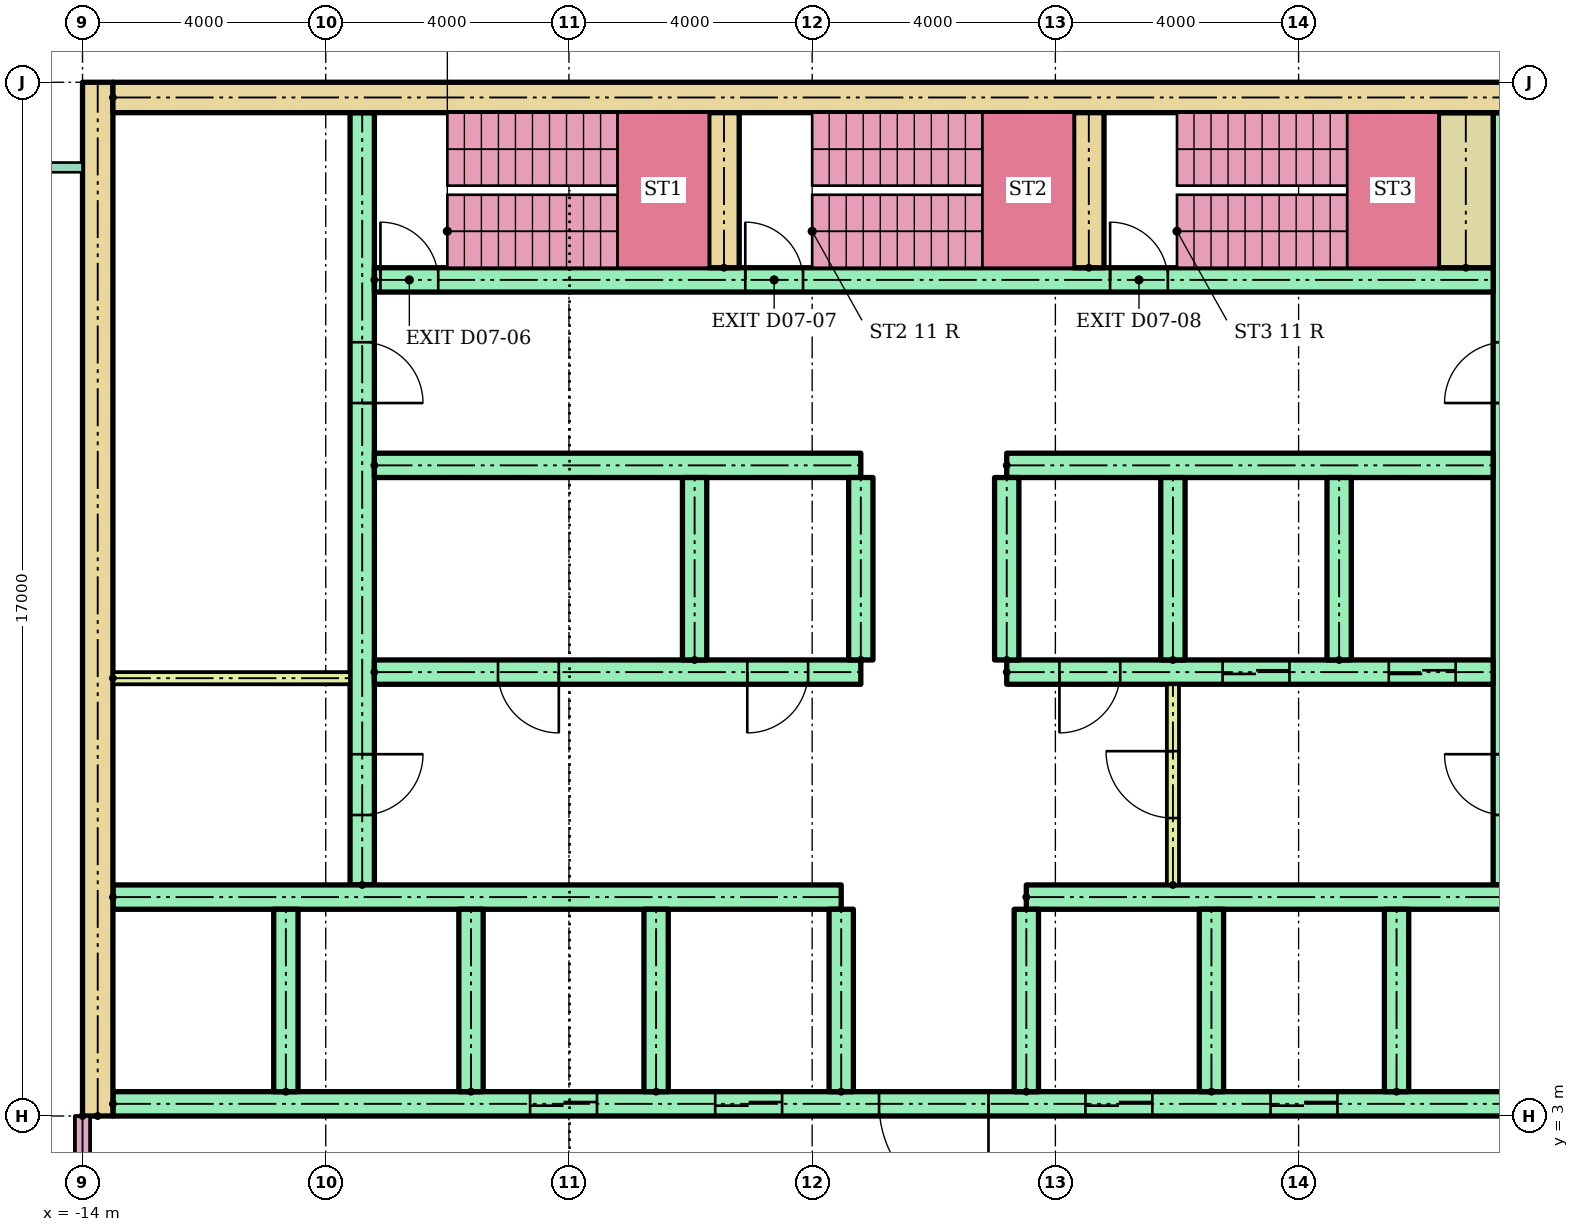
"""IFC4 building model, lengths in metres.
Left out: names, types, materials, properties, quantities, classifications, styles, units other than length and angle.
Written with IfcOpenShell. Run it as: python <this file> out.ifc"""

import sys

from ifc_helpers import new_model, si_unit, direction, frame, frame_2d, origin, place, context, subcontext, project, spatial, rectangle, extrude, element, fill, save


model = new_model("IFC4")
c1 = context("Model", 3, precision=1e-05, world=origin(), true_north=direction((0.0, 1.0)))
c2 = subcontext(c1, "Body", "Model", "MODEL_VIEW")
j1 = project(units=[si_unit("LENGTHUNIT", "METRE"), si_unit("PLANEANGLEUNIT", "RADIAN")], contexts=[c1])
p1 = place(None, origin())
s1 = spatial("IfcSite", under=j1, at=p1, CompositionType="ELEMENT")
p2 = place(p1, origin())
s2 = spatial("IfcBuilding", under=s1, at=p2, CompositionType="ELEMENT")
p3 = place(p2, frame((0.0, 0.0, 29.9)))
s3 = spatial("IfcBuildingStorey", under=s2, at=p3, CompositionType="ELEMENT", Elevation=29.9)
p4 = place(p3, frame((-13.75, 3.0, 0.0), z_axis=(0.0, 0.0, 1.0), x_axis=(0.0, 1.0, 0.0)))
e1 = element("IfcWall", 1, at=p4, inside=s3, PredefinedType="SHEAR", context=c2, shape_type="SweptSolid", body=[
    extrude(rectangle(XDim=17.0, YDim=0.5, at=frame_2d((8.5, 0.0))), origin(), (0.0, 0.0, 1.0), 3.6),
])
p5 = place(p3, frame((-13.5, 19.75, 0.0)))
e2 = element("IfcWall", 2, at=p5, inside=s3, PredefinedType="SHEAR", context=c2, shape_type="SweptSolid", body=[
    extrude(rectangle(XDim=27.0, YDim=0.5, at=frame_2d((13.5, 0.0))), origin(), (0.0, 0.0, 1.0), 3.6),
])
p6 = place(p3, frame((-9.4, 6.8, 0.0), z_axis=(0.0, 0.0, 1.0), x_axis=(0.0, 1.0, 0.0)))
e3 = element("IfcWall", 3, at=p6, inside=s3, PredefinedType="SHEAR", context=c2, shape_type="SweptSolid", body=[
    extrude(rectangle(XDim=12.7, YDim=0.4, at=frame_2d((6.35, 0.0))), origin(), (0.0, 0.0, 1.0), 3.6),
])
p7 = place(p6, frame((1.15, 0.0, 0.0)))
e4 = element("IfcOpeningElement", 4, at=p7, cuts=e3, PredefinedType="OPENING", context=c2, shape_type="SweptSolid", body=[
    extrude(rectangle(XDim=1.0, YDim=2.1, at=frame_2d((0.5, 1.05))), frame((0.0, 0.21, 0.0), z_axis=(0.0, -1.0, 0.0), x_axis=(1.0, 0.0, 0.0)), (0.0, 0.0, 1.0), 0.42),
])
p8 = place(p6, frame((7.925, 0.0, 0.0)))
e5 = element("IfcOpeningElement", 5, at=p8, cuts=e3, PredefinedType="OPENING", context=c2, shape_type="SweptSolid", body=[
    extrude(rectangle(XDim=1.0, YDim=2.1, at=frame_2d((0.5, 1.05))), frame((0.0, 0.21, 0.0), z_axis=(0.0, -1.0, 0.0), x_axis=(1.0, 0.0, 0.0)), (0.0, 0.0, 1.0), 0.42),
])
p9 = place(p3, frame((9.4, 6.8, 0.0), z_axis=(0.0, 0.0, 1.0), x_axis=(0.0, 1.0, 0.0)))
e6 = element("IfcWall", 6, at=p9, inside=s3, PredefinedType="SHEAR", context=c2, shape_type="SweptSolid", body=[
    extrude(rectangle(XDim=12.7, YDim=0.4, at=frame_2d((6.35, 0.0))), origin(), (0.0, 0.0, 1.0), 3.6),
])
p10 = place(p9, frame((1.15, 0.0, 0.0)))
e7 = element("IfcOpeningElement", 7, at=p10, cuts=e6, PredefinedType="OPENING", context=c2, shape_type="SweptSolid", body=[
    extrude(rectangle(XDim=1.0, YDim=2.1, at=frame_2d((0.5, 1.05))), frame((0.0, 0.21, 0.0), z_axis=(0.0, -1.0, 0.0), x_axis=(1.0, 0.0, 0.0)), (0.0, 0.0, 1.0), 0.42),
])
p11 = place(p9, frame((7.925, 0.0, 0.0)))
e8 = element("IfcOpeningElement", 8, at=p11, cuts=e6, PredefinedType="OPENING", context=c2, shape_type="SweptSolid", body=[
    extrude(rectangle(XDim=1.0, YDim=2.1, at=frame_2d((0.5, 1.05))), frame((0.0, 0.21, 0.0), z_axis=(0.0, -1.0, 0.0), x_axis=(1.0, 0.0, 0.0)), (0.0, 0.0, 1.0), 0.42),
])
p12 = place(p3, frame((-13.5, 3.2, 0.0)))
e9 = element("IfcWall", 9, at=p12, inside=s3, PredefinedType="SHEAR", context=c2, shape_type="SweptSolid", body=[
    extrude(rectangle(XDim=27.0, YDim=0.4, at=frame_2d((13.5, 0.0))), origin(), (0.0, 0.0, 1.0), 3.6),
])
p13 = place(p12, frame((6.861, 0.0, 0.0)))
e10 = element("IfcOpeningElement", 10, at=p13, cuts=e9, PredefinedType="OPENING", context=c2, shape_type="SweptSolid", body=[
    extrude(rectangle(XDim=1.1, YDim=2.1, at=frame_2d((0.55, 1.05))), frame((0.0, 0.21, 0.0), z_axis=(0.0, -1.0, 0.0), x_axis=(1.0, 0.0, 0.0)), (0.0, 0.0, 1.0), 0.42),
])
p14 = place(p12, frame((9.906, 0.0, 0.0)))
e11 = element("IfcOpeningElement", 11, at=p14, cuts=e9, PredefinedType="OPENING", context=c2, shape_type="SweptSolid", body=[
    extrude(rectangle(XDim=1.1, YDim=2.1, at=frame_2d((0.55, 1.05))), frame((0.0, 0.21, 0.0), z_axis=(0.0, -1.0, 0.0), x_axis=(1.0, 0.0, 0.0)), (0.0, 0.0, 1.0), 0.42),
])
p15 = place(p12, frame((15.994, 0.0, 0.0)))
e12 = element("IfcOpeningElement", 12, at=p15, cuts=e9, PredefinedType="OPENING", context=c2, shape_type="SweptSolid", body=[
    extrude(rectangle(XDim=1.1, YDim=2.1, at=frame_2d((0.55, 1.05))), frame((0.0, 0.21, 0.0), z_axis=(0.0, -1.0, 0.0), x_axis=(1.0, 0.0, 0.0)), (0.0, 0.0, 1.0), 0.42),
])
p16 = place(p12, frame((19.039, 0.0, 0.0)))
e13 = element("IfcOpeningElement", 13, at=p16, cuts=e9, PredefinedType="OPENING", context=c2, shape_type="SweptSolid", body=[
    extrude(rectangle(XDim=1.1, YDim=2.1, at=frame_2d((0.55, 1.05))), frame((0.0, 0.21, 0.0), z_axis=(0.0, -1.0, 0.0), x_axis=(1.0, 0.0, 0.0)), (0.0, 0.0, 1.0), 0.42),
])
p17 = place(p12, frame((12.6, 0.0, 0.0)))
e14 = element("IfcOpeningElement", 14, at=p17, cuts=e9, PredefinedType="OPENING", context=c2, shape_type="SweptSolid", body=[
    extrude(rectangle(XDim=1.8, YDim=2.1, at=frame_2d((0.9, 1.05))), frame((0.0, 0.21, 0.0), z_axis=(0.0, -1.0, 0.0), x_axis=(1.0, 0.0, 0.0)), (0.0, 0.0, 1.0), 0.42),
])
p18 = place(p3, frame((-13.5, 6.6, 0.0)))
e15 = element("IfcWall", 15, at=p18, inside=s3, PredefinedType="SHEAR", context=c2, shape_type="SweptSolid", body=[
    extrude(rectangle(XDim=11.978, YDim=0.4, at=frame_2d((5.989, 0.0))), origin(), (0.0, 0.0, 1.0), 3.6),
])
p19 = place(p3, frame((1.522, 6.6, 0.0)))
e16 = element("IfcWall", 16, at=p19, inside=s3, PredefinedType="SHEAR", context=c2, shape_type="SweptSolid", body=[
    extrude(rectangle(XDim=8.078, YDim=0.4, at=frame_2d((4.039, 0.0))), origin(), (0.0, 0.0, 1.0), 3.6),
])
for number, where, z_axis, x_axis in (
    (17, (-10.656, 3.4, 0.0), (0.0, 0.0, 1.0), (0.0, 1.0, 0.0)),
    (18, (-7.611, 3.4, 0.0), (0.0, 0.0, 1.0), (0.0, 1.0, 0.0)),
    (19, (-4.567, 3.4, 0.0), (0.0, 0.0, 1.0), (0.0, 1.0, 0.0)),
    (20, (-1.522, 3.4, 0.0), (0.0, 0.0, 1.0), (0.0, 1.0, 0.0)),
    (21, (1.522, 3.4, 0.0), (0.0, 0.0, 1.0), (0.0, 1.0, 0.0)),
    (22, (4.567, 3.4, 0.0), (0.0, 0.0, 1.0), (0.0, 1.0, 0.0)),
    (23, (7.611, 3.4, 0.0), (0.0, 0.0, 1.0), (0.0, 1.0, 0.0)),
):
    element("IfcWall", number, at=place(p3, frame(where, z_axis=z_axis, x_axis=x_axis)), inside=s3, PredefinedType="SHEAR", context=c2, shape_type="SweptSolid", body=[
        extrude(rectangle(XDim=3.0, YDim=0.4, at=frame_2d((1.5, 0.0))), origin(), (0.0, 0.0, 1.0), 3.6),
    ])
p20 = place(p3, frame((-9.2, 10.3, 0.0)))
e24 = element("IfcWall", 24, at=p20, inside=s3, PredefinedType="SHEAR", context=c2, shape_type="SweptSolid", body=[
    extrude(rectangle(XDim=8.0, YDim=0.4, at=frame_2d((4.0, 0.0))), origin(), (0.0, 0.0, 1.0), 3.6),
])
p21 = place(p20, frame((2.033, 0.0, 0.0)))
e25 = element("IfcOpeningElement", 25, at=p21, cuts=e24, PredefinedType="OPENING", context=c2, shape_type="SweptSolid", body=[
    extrude(rectangle(XDim=1.0, YDim=2.1, at=frame_2d((0.5, 1.05))), frame((0.0, 0.21, 0.0), z_axis=(0.0, -1.0, 0.0), x_axis=(1.0, 0.0, 0.0)), (0.0, 0.0, 1.0), 0.42),
])
p22 = place(p20, frame((6.133, 0.0, 0.0)))
e26 = element("IfcOpeningElement", 26, at=p22, cuts=e24, PredefinedType="OPENING", context=c2, shape_type="SweptSolid", body=[
    extrude(rectangle(XDim=1.0, YDim=2.1, at=frame_2d((0.5, 1.05))), frame((0.0, 0.21, 0.0), z_axis=(0.0, -1.0, 0.0), x_axis=(1.0, 0.0, 0.0)), (0.0, 0.0, 1.0), 0.42),
])
p23 = place(p3, frame((-9.2, 13.7, 0.0)))
e27 = element("IfcWall", 27, at=p23, inside=s3, PredefinedType="SHEAR", context=c2, shape_type="SweptSolid", body=[
    extrude(rectangle(XDim=8.0, YDim=0.4, at=frame_2d((4.0, 0.0))), origin(), (0.0, 0.0, 1.0), 3.6),
])
p24 = place(p3, frame((1.2, 10.3, 0.0)))
e28 = element("IfcWall", 28, at=p24, inside=s3, PredefinedType="SHEAR", context=c2, shape_type="SweptSolid", body=[
    extrude(rectangle(XDim=8.0, YDim=0.4, at=frame_2d((4.0, 0.0))), origin(), (0.0, 0.0, 1.0), 3.6),
])
p25 = place(p24, frame((3.55, 0.0, 0.0)))
e29 = element("IfcOpeningElement", 29, at=p25, cuts=e28, PredefinedType="OPENING", context=c2, shape_type="SweptSolid", body=[
    extrude(rectangle(XDim=1.1, YDim=2.1, at=frame_2d((0.55, 1.05))), frame((0.0, 0.21, 0.0), z_axis=(0.0, -1.0, 0.0), x_axis=(1.0, 0.0, 0.0)), (0.0, 0.0, 1.0), 0.42),
])
p26 = place(p24, frame((6.283, 0.0, 0.0)))
e30 = element("IfcOpeningElement", 30, at=p26, cuts=e28, PredefinedType="OPENING", context=c2, shape_type="SweptSolid", body=[
    extrude(rectangle(XDim=1.1, YDim=2.1, at=frame_2d((0.55, 1.05))), frame((0.0, 0.21, 0.0), z_axis=(0.0, -1.0, 0.0), x_axis=(1.0, 0.0, 0.0)), (0.0, 0.0, 1.0), 0.42),
])
p27 = place(p24, frame((0.867, 0.0, 0.0)))
e31 = element("IfcOpeningElement", 31, at=p27, cuts=e28, PredefinedType="OPENING", context=c2, shape_type="SweptSolid", body=[
    extrude(rectangle(XDim=1.0, YDim=2.1, at=frame_2d((0.5, 1.05))), frame((0.0, 0.21, 0.0), z_axis=(0.0, -1.0, 0.0), x_axis=(1.0, 0.0, 0.0)), (0.0, 0.0, 1.0), 0.42),
])
p28 = place(p3, frame((1.2, 13.7, 0.0)))
e32 = element("IfcWall", 32, at=p28, inside=s3, PredefinedType="SHEAR", context=c2, shape_type="SweptSolid", body=[
    extrude(rectangle(XDim=8.0, YDim=0.4, at=frame_2d((4.0, 0.0))), origin(), (0.0, 0.0, 1.0), 3.6),
])
for number, where, z_axis, x_axis in (
    (33, (-3.933, 10.5, 0.0), (0.0, 0.0, 1.0), (0.0, 1.0, 0.0)),
    (34, (-1.2, 10.5, 0.0), (0.0, 0.0, 1.0), (0.0, 1.0, 0.0)),
    (35, (1.2, 10.5, 0.0), (0.0, 0.0, 1.0), (0.0, 1.0, 0.0)),
    (36, (3.933, 10.5, 0.0), (0.0, 0.0, 1.0), (0.0, 1.0, 0.0)),
    (37, (6.667, 10.5, 0.0), (0.0, 0.0, 1.0), (0.0, 1.0, 0.0)),
):
    element("IfcWall", number, at=place(p3, frame(where, z_axis=z_axis, x_axis=x_axis)), inside=s3, PredefinedType="SHEAR", context=c2, shape_type="SweptSolid", body=[
        extrude(rectangle(XDim=3.0, YDim=0.4, at=frame_2d((1.5, 0.0))), origin(), (0.0, 0.0, 1.0), 3.6),
    ])
p29 = place(p3, frame((3.933, 6.8, 0.0), z_axis=(0.0, 0.0, 1.0), x_axis=(0.0, 1.0, 0.0)))
e38 = element("IfcWall", 38, at=p29, inside=s3, PredefinedType="PARTITIONING", context=c2, shape_type="SweptSolid", body=[
    extrude(rectangle(XDim=3.3, YDim=0.2, at=frame_2d((1.65, 0.0))), origin(), (0.0, 0.0, 1.0), 3.6),
])
p30 = place(p29, frame((1.1, 0.0, 0.0)))
e39 = element("IfcOpeningElement", 39, at=p30, cuts=e38, PredefinedType="OPENING", context=c2, shape_type="SweptSolid", body=[
    extrude(rectangle(XDim=1.1, YDim=2.1, at=frame_2d((0.55, 1.05))), frame((0.0, 0.11, 0.0), z_axis=(0.0, -1.0, 0.0), x_axis=(1.0, 0.0, 0.0)), (0.0, 0.0, 1.0), 0.22),
])
p31 = place(p3, frame((-9.2, 16.75, 0.0)))
e40 = element("IfcWall", 40, at=p31, inside=s3, PredefinedType="SHEAR", context=c2, shape_type="SweptSolid", body=[
    extrude(rectangle(XDim=18.4, YDim=0.4, at=frame_2d((9.2, 0.0))), origin(), (0.0, 0.0, 1.0), 3.6),
])
p32 = place(p31, frame((0.1, 0.0, 0.0)))
e41 = element("IfcOpeningElement", 41, at=p32, cuts=e40, PredefinedType="OPENING", context=c2, shape_type="SweptSolid", body=[
    extrude(rectangle(XDim=0.95, YDim=2.1, at=frame_2d((0.475, 1.05))), frame((0.0, 0.21, 0.0), z_axis=(0.0, -1.0, 0.0), x_axis=(1.0, 0.0, 0.0)), (0.0, 0.0, 1.0), 0.42),
])
p33 = place(p31, frame((6.1, 0.0, 0.0)))
e42 = element("IfcOpeningElement", 42, at=p33, cuts=e40, PredefinedType="OPENING", context=c2, shape_type="SweptSolid", body=[
    extrude(rectangle(XDim=0.95, YDim=2.1, at=frame_2d((0.475, 1.05))), frame((0.0, 0.21, 0.0), z_axis=(0.0, -1.0, 0.0), x_axis=(1.0, 0.0, 0.0)), (0.0, 0.0, 1.0), 0.42),
])
p34 = place(p31, frame((12.1, 0.0, 0.0)))
e43 = element("IfcOpeningElement", 43, at=p34, cuts=e40, PredefinedType="OPENING", context=c2, shape_type="SweptSolid", body=[
    extrude(rectangle(XDim=0.95, YDim=2.1, at=frame_2d((0.475, 1.05))), frame((0.0, 0.21, 0.0), z_axis=(0.0, -1.0, 0.0), x_axis=(1.0, 0.0, 0.0)), (0.0, 0.0, 1.0), 0.42),
])
for number, where, z_axis, x_axis in (
    (44, (-3.45, 16.95, 0.0), (0.0, 0.0, 1.0), (0.0, 1.0, 0.0)),
    (45, (2.55, 16.95, 0.0), (0.0, 0.0, 1.0), (0.0, 1.0, 0.0)),
):
    element("IfcWall", number, at=place(p3, frame(where, z_axis=z_axis, x_axis=x_axis)), inside=s3, PredefinedType="SHEAR", context=c2, shape_type="SweptSolid", body=[
        extrude(rectangle(XDim=2.55, YDim=0.5, at=frame_2d((1.275, 0.0))), origin(), (0.0, 0.0, 1.0), 3.6),
    ])
p35 = place(p3, frame((8.75, 16.95, 0.0), z_axis=(0.0, 0.0, 1.0), x_axis=(0.0, 1.0, 0.0)))
e46 = element("IfcWall", 46, at=p35, inside=s3, PredefinedType="SHEAR", context=c2, shape_type="SweptSolid", body=[
    extrude(rectangle(XDim=2.55, YDim=0.9, at=frame_2d((1.275, 0.0))), origin(), (0.0, 0.0, 1.0), 3.6),
])
p36 = place(p3, frame((-13.5, 10.2, 0.0)))
e47 = element("IfcWall", 47, at=p36, inside=s3, PredefinedType="PARTITIONING", context=c2, shape_type="SweptSolid", body=[
    extrude(rectangle(XDim=3.9, YDim=0.2, at=frame_2d((1.95, 0.0))), origin(), (0.0, 0.0, 1.0), 3.6),
])
p37 = place(p3, frame((-14.0, 3.0, 0.0), z_axis=(0.0, 0.0, 1.0), x_axis=(0.0, -1.0, 0.0)))
e48 = element("IfcWall", 48, at=p37, inside=s3, PredefinedType="PARTITIONING", context=c2, shape_type="SweptSolid", body=[
    extrude(rectangle(XDim=1.6, YDim=0.25, at=frame_2d((0.8, 0.0))), origin(), (0.0, 0.0, 1.0), 3.1),
])
p38 = place(p13, origin())
e49 = element("IfcDoor", 49, at=p38, inside=s3, OperationType="SLIDING_TO_LEFT", PredefinedType="DOOR", context=c2, shape_type="SweptSolid", body=[
    extrude(rectangle(XDim=1.1, YDim=2.1, at=frame_2d((0.55, 1.05))), frame((0.0, 0.025, 0.0), z_axis=(0.0, -1.0, 0.0), x_axis=(1.0, 0.0, 0.0)), (0.0, 0.0, 1.0), 0.05),
])
fill(e10, e49)
p39 = place(p14, origin())
e50 = element("IfcDoor", 50, at=p39, inside=s3, OperationType="SLIDING_TO_LEFT", PredefinedType="DOOR", context=c2, shape_type="SweptSolid", body=[
    extrude(rectangle(XDim=1.1, YDim=2.1, at=frame_2d((0.55, 1.05))), frame((0.0, 0.025, 0.0), z_axis=(0.0, -1.0, 0.0), x_axis=(1.0, 0.0, 0.0)), (0.0, 0.0, 1.0), 0.05),
])
fill(e11, e50)
p40 = place(p15, origin())
e51 = element("IfcDoor", 51, at=p40, inside=s3, OperationType="SLIDING_TO_LEFT", PredefinedType="DOOR", context=c2, shape_type="SweptSolid", body=[
    extrude(rectangle(XDim=1.1, YDim=2.1, at=frame_2d((0.55, 1.05))), frame((0.0, 0.025, 0.0), z_axis=(0.0, -1.0, 0.0), x_axis=(1.0, 0.0, 0.0)), (0.0, 0.0, 1.0), 0.05),
])
fill(e12, e51)
p41 = place(p16, origin())
e52 = element("IfcDoor", 52, at=p41, inside=s3, OperationType="SLIDING_TO_LEFT", PredefinedType="DOOR", context=c2, shape_type="SweptSolid", body=[
    extrude(rectangle(XDim=1.1, YDim=2.1, at=frame_2d((0.55, 1.05))), frame((0.0, 0.025, 0.0), z_axis=(0.0, -1.0, 0.0), x_axis=(1.0, 0.0, 0.0)), (0.0, 0.0, 1.0), 0.05),
])
fill(e13, e52)
p42 = place(p17, frame((1.8, 0.0, 0.0), z_axis=(0.0, 0.0, 1.0), x_axis=(-1.0, 0.0, 0.0)))
e53 = element("IfcDoor", 53, at=p42, inside=s3, OperationType="DOUBLE_DOOR_SINGLE_SWING", PredefinedType="DOOR", context=c2, shape_type="SweptSolid", body=[
    extrude(rectangle(XDim=1.8, YDim=2.1, at=frame_2d((0.9, 1.05))), frame((0.0, 0.025, 0.0), z_axis=(0.0, -1.0, 0.0), x_axis=(1.0, 0.0, 0.0)), (0.0, 0.0, 1.0), 0.05),
])
fill(e14, e53)
p43 = place(p25, origin())
e54 = element("IfcDoor", 54, at=p43, inside=s3, OperationType="SLIDING_TO_LEFT", PredefinedType="DOOR", context=c2, shape_type="SweptSolid", body=[
    extrude(rectangle(XDim=1.1, YDim=2.1, at=frame_2d((0.55, 1.05))), frame((0.0, 0.025, 0.0), z_axis=(0.0, -1.0, 0.0), x_axis=(1.0, 0.0, 0.0)), (0.0, 0.0, 1.0), 0.05),
])
fill(e29, e54)
p44 = place(p26, origin())
e55 = element("IfcDoor", 55, at=p44, inside=s3, OperationType="SLIDING_TO_LEFT", PredefinedType="DOOR", context=c2, shape_type="SweptSolid", body=[
    extrude(rectangle(XDim=1.1, YDim=2.1, at=frame_2d((0.55, 1.05))), frame((0.0, 0.025, 0.0), z_axis=(0.0, -1.0, 0.0), x_axis=(1.0, 0.0, 0.0)), (0.0, 0.0, 1.0), 0.05),
])
fill(e30, e55)
p45 = place(p21, frame((1.0, 0.0, 0.0), z_axis=(0.0, 0.0, 1.0), x_axis=(-1.0, 0.0, 0.0)))
e56 = element("IfcDoor", 56, at=p45, inside=s3, OperationType="SINGLE_SWING_RIGHT", PredefinedType="DOOR", context=c2, shape_type="SweptSolid", body=[
    extrude(rectangle(XDim=1.0, YDim=2.1, at=frame_2d((0.5, 1.05))), frame((0.0, 0.025, 0.0), z_axis=(0.0, -1.0, 0.0), x_axis=(1.0, 0.0, 0.0)), (0.0, 0.0, 1.0), 0.05),
])
fill(e25, e56)
p46 = place(p22, frame((1.0, 0.0, 0.0), z_axis=(0.0, 0.0, 1.0), x_axis=(-1.0, 0.0, 0.0)))
e57 = element("IfcDoor", 57, at=p46, inside=s3, OperationType="SINGLE_SWING_LEFT", PredefinedType="DOOR", context=c2, shape_type="SweptSolid", body=[
    extrude(rectangle(XDim=1.0, YDim=2.1, at=frame_2d((0.5, 1.05))), frame((0.0, 0.025, 0.0), z_axis=(0.0, -1.0, 0.0), x_axis=(1.0, 0.0, 0.0)), (0.0, 0.0, 1.0), 0.05),
])
fill(e26, e57)
p47 = place(p27, frame((1.0, 0.0, 0.0), z_axis=(0.0, 0.0, 1.0), x_axis=(-1.0, 0.0, 0.0)))
e58 = element("IfcDoor", 58, at=p47, inside=s3, OperationType="SINGLE_SWING_LEFT", PredefinedType="DOOR", context=c2, shape_type="SweptSolid", body=[
    extrude(rectangle(XDim=1.0, YDim=2.1, at=frame_2d((0.5, 1.05))), frame((0.0, 0.025, 0.0), z_axis=(0.0, -1.0, 0.0), x_axis=(1.0, 0.0, 0.0)), (0.0, 0.0, 1.0), 0.05),
])
fill(e31, e58)
p48 = place(p30, origin())
e59 = element("IfcDoor", 59, at=p48, inside=s3, OperationType="SINGLE_SWING_RIGHT", PredefinedType="DOOR", context=c2, shape_type="SweptSolid", body=[
    extrude(rectangle(XDim=1.1, YDim=2.1, at=frame_2d((0.55, 1.05))), frame((0.0, 0.025, 0.0), z_axis=(0.0, -1.0, 0.0), x_axis=(1.0, 0.0, 0.0)), (0.0, 0.0, 1.0), 0.05),
])
fill(e39, e59)
p49 = place(p32, origin())
e60 = element("IfcDoor", 60, at=p49, inside=s3, OperationType="SINGLE_SWING_LEFT", PredefinedType="DOOR", context=c2, shape_type="SweptSolid", body=[
    extrude(rectangle(XDim=0.95, YDim=2.1, at=frame_2d((0.475, 1.05))), frame((0.0, 0.025, 0.0), z_axis=(0.0, -1.0, 0.0), x_axis=(1.0, 0.0, 0.0)), (0.0, 0.0, 1.0), 0.05),
])
fill(e41, e60)
p50 = place(p33, origin())
e61 = element("IfcDoor", 61, at=p50, inside=s3, OperationType="SINGLE_SWING_LEFT", PredefinedType="DOOR", context=c2, shape_type="SweptSolid", body=[
    extrude(rectangle(XDim=0.95, YDim=2.1, at=frame_2d((0.475, 1.05))), frame((0.0, 0.025, 0.0), z_axis=(0.0, -1.0, 0.0), x_axis=(1.0, 0.0, 0.0)), (0.0, 0.0, 1.0), 0.05),
])
fill(e42, e61)
p51 = place(p34, origin())
e62 = element("IfcDoor", 62, at=p51, inside=s3, OperationType="SINGLE_SWING_LEFT", PredefinedType="DOOR", context=c2, shape_type="SweptSolid", body=[
    extrude(rectangle(XDim=0.95, YDim=2.1, at=frame_2d((0.475, 1.05))), frame((0.0, 0.025, 0.0), z_axis=(0.0, -1.0, 0.0), x_axis=(1.0, 0.0, 0.0)), (0.0, 0.0, 1.0), 0.05),
])
fill(e43, e62)
p52 = place(p7, frame((1.0, 0.0, 0.0), z_axis=(0.0, 0.0, 1.0), x_axis=(-1.0, 0.0, 0.0)))
e63 = element("IfcDoor", 63, at=p52, inside=s3, OperationType="SINGLE_SWING_RIGHT", PredefinedType="DOOR", context=c2, shape_type="SweptSolid", body=[
    extrude(rectangle(XDim=1.0, YDim=2.1, at=frame_2d((0.5, 1.05))), frame((0.0, 0.025, 0.0), z_axis=(0.0, -1.0, 0.0), x_axis=(1.0, 0.0, 0.0)), (0.0, 0.0, 1.0), 0.05),
])
fill(e4, e63)
p53 = place(p8, frame((1.0, 0.0, 0.0), z_axis=(0.0, 0.0, 1.0), x_axis=(-1.0, 0.0, 0.0)))
e64 = element("IfcDoor", 64, at=p53, inside=s3, OperationType="SINGLE_SWING_LEFT", PredefinedType="DOOR", context=c2, shape_type="SweptSolid", body=[
    extrude(rectangle(XDim=1.0, YDim=2.1, at=frame_2d((0.5, 1.05))), frame((0.0, 0.025, 0.0), z_axis=(0.0, -1.0, 0.0), x_axis=(1.0, 0.0, 0.0)), (0.0, 0.0, 1.0), 0.05),
])
fill(e5, e64)
save(model, sys.argv[1])
